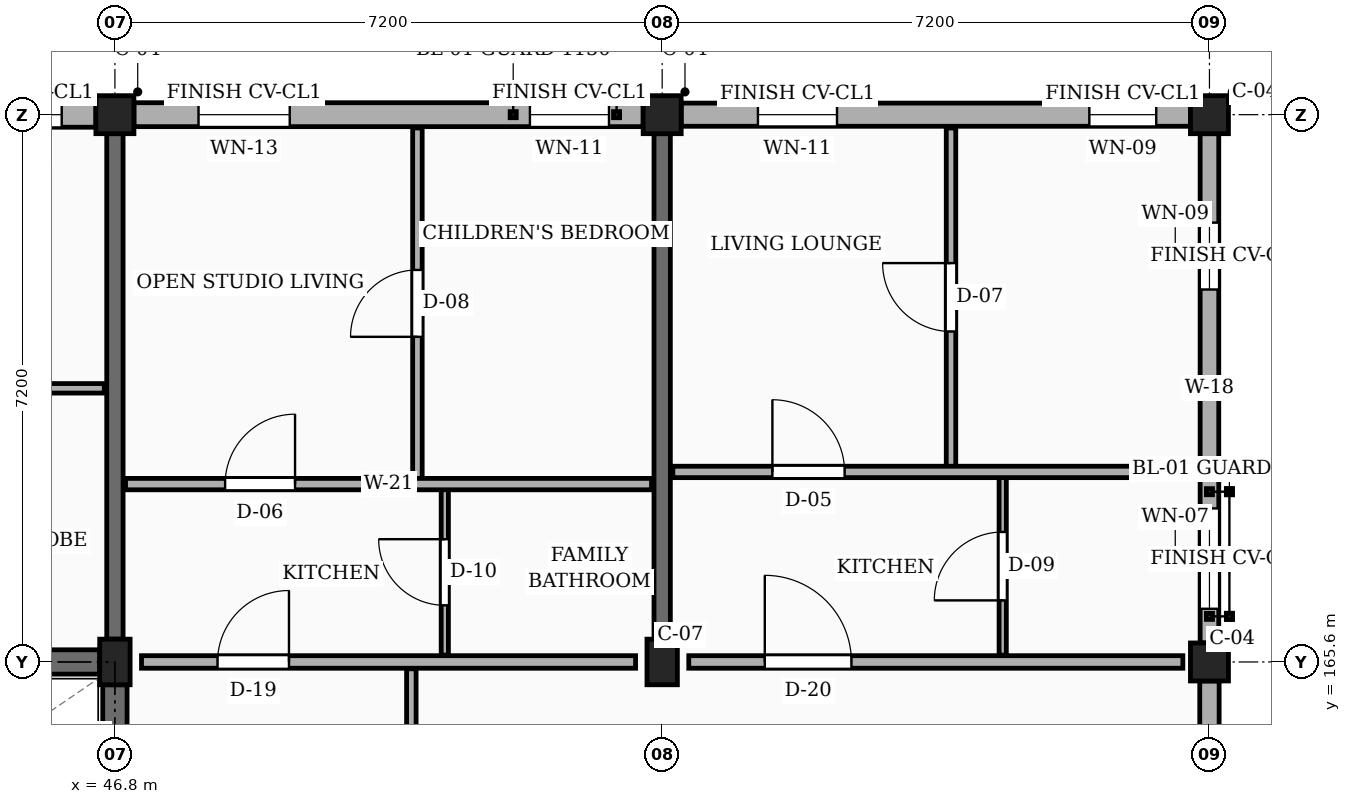
"""IFC4 building model, lengths in metres.
Left out: names, types, materials, properties, quantities, classifications, styles, units other than length and angle.
Written with IfcOpenShell. Run it as: python <this file> out.ifc"""

import sys

from ifc_helpers import new_model, si_unit, direction, frame, frame_2d, origin, origin_2d, place, context, subcontext, project, spatial, rectangle, extrude, element, fill, save


model = new_model("IFC4")
c1 = context("Model", 3, precision=1e-05, world=origin(), true_north=direction((0.0, 1.0)))
c2 = subcontext(c1, "Body", "Model", "MODEL_VIEW")
j1 = project(units=[si_unit("LENGTHUNIT", "METRE"), si_unit("PLANEANGLEUNIT", "RADIAN")], contexts=[c1])
p1 = place(None, origin())
s1 = spatial("IfcSite", under=j1, at=p1, CompositionType="ELEMENT")
p2 = place(p1, origin())
s2 = spatial("IfcBuilding", under=s1, at=p2, CompositionType="ELEMENT")
p3 = place(p2, frame((0.0, 0.0, 32.85)))
s3 = spatial("IfcBuildingStorey", under=s2, at=p3, CompositionType="ELEMENT", Elevation=32.85)
p4 = place(p3, frame((46.8, 165.6, 0.0), z_axis=(0.0, 0.0, 1.0), x_axis=(1.0, 0.0, 0.0)))
e1 = element("IfcColumn", 1, at=p4, inside=s3, PredefinedType="COLUMN", context=c2, shape_type="SweptSolid", body=[
    extrude(rectangle(XDim=0.4, YDim=0.6, at=origin_2d()), origin(), (0.0, 0.0, 1.0), 3.15),
])
p5 = place(p3, frame((46.8, 172.8, 0.0), z_axis=(0.0, 0.0, 1.0), x_axis=(1.0, 0.0, 0.0)))
e2 = element("IfcColumn", 2, at=p5, inside=s3, PredefinedType="COLUMN", context=c2, shape_type="SweptSolid", body=[
    extrude(rectangle(XDim=0.5, YDim=0.5, at=origin_2d()), origin(), (0.0, 0.0, 1.0), 3.15),
])
p6 = place(p3, frame((54.0, 165.6, 0.0), z_axis=(0.0, 0.0, 1.0), x_axis=(1.0, 0.0, 0.0)))
e3 = element("IfcColumn", 3, at=p6, inside=s3, PredefinedType="COLUMN", context=c2, shape_type="SweptSolid", body=[
    extrude(rectangle(XDim=0.4, YDim=0.6, at=origin_2d()), origin(), (0.0, 0.0, 1.0), 3.15),
])
for number, where, z_axis, x_axis in (
    (4, (54.0, 172.8, 0.0), (0.0, 0.0, 1.0), (1.0, 0.0, 0.0)),
    (5, (61.2, 165.6, 0.0), (0.0, 0.0, 1.0), (1.0, 0.0, 0.0)),
    (6, (61.2, 172.8, 0.0), (0.0, 0.0, 1.0), (1.0, 0.0, 0.0)),
):
    element("IfcColumn", number, at=place(p3, frame(where, z_axis=z_axis, x_axis=x_axis)), inside=s3, PredefinedType="COLUMN", context=c2, shape_type="SweptSolid", body=[
        extrude(rectangle(XDim=0.5, YDim=0.5, at=origin_2d()), origin(), (0.0, 0.0, 1.0), 3.15),
    ])
for number, where, z_axis, x_axis in (
    (7, (46.8, 165.9, 0.0), (0.0, 0.0, 1.0), (0.0, 1.0, 0.0)),
    (8, (54.0, 165.9, 0.0), (0.0, 0.0, 1.0), (0.0, 1.0, 0.0)),
):
    element("IfcWall", number, at=place(p3, frame(where, z_axis=z_axis, x_axis=x_axis)), inside=s3, PredefinedType="SOLIDWALL", context=c2, shape_type="SweptSolid", body=[
        extrude(rectangle(XDim=6.65, YDim=0.215, at=frame_2d((3.325, 0.0))), origin(), (0.0, 0.0, 1.0), 2.185),
    ])
p7 = place(p3, frame((61.2, 158.65, 0.0), z_axis=(0.0, 0.0, 1.0), x_axis=(0.0, 1.0, 0.0)))
e9 = element("IfcWall", 9, at=p7, inside=s3, PredefinedType="SOLIDWALL", context=c2, shape_type="SweptSolid", body=[
    extrude(rectangle(XDim=6.7, YDim=0.255, at=frame_2d((3.35, 0.0))), origin(), (0.0, 0.0, 1.0), 2.455),
])
p8 = place(p7, frame((0.45, 0.0, 0.78)))
e10 = element("IfcOpeningElement", 10, at=p8, cuts=e9, PredefinedType="OPENING", context=c2, shape_type="SweptSolid", body=[
    extrude(rectangle(XDim=1.16, YDim=1.15, at=frame_2d((0.58, 0.575))), frame((0.0, 0.137, 0.0), z_axis=(0.0, -1.0, 0.0), x_axis=(1.0, 0.0, 0.0)), (0.0, 0.0, 1.0), 0.275),
])
p9 = place(p7, frame((4.65, 0.0, 0.78)))
e11 = element("IfcOpeningElement", 11, at=p9, cuts=e9, PredefinedType="OPENING", context=c2, shape_type="SweptSolid", body=[
    extrude(rectangle(XDim=1.32, YDim=1.15, at=frame_2d((0.66, 0.575))), frame((0.0, 0.137, 0.0), z_axis=(0.0, -1.0, 0.0), x_axis=(1.0, 0.0, 0.0)), (0.0, 0.0, 1.0), 0.275),
])
p10 = place(p3, frame((61.2, 165.85, 0.0), z_axis=(0.0, 0.0, 1.0), x_axis=(0.0, 1.0, 0.0)))
e12 = element("IfcWall", 12, at=p10, inside=s3, PredefinedType="SOLIDWALL", context=c2, shape_type="SweptSolid", body=[
    extrude(rectangle(XDim=6.7, YDim=0.245, at=frame_2d((3.35, 0.0))), origin(), (0.0, 0.0, 1.0), 2.455),
])
p11 = place(p10, frame((0.45, 0.0, 0.78)))
e13 = element("IfcOpeningElement", 13, at=p11, cuts=e12, PredefinedType="OPENING", context=c2, shape_type="SweptSolid", body=[
    extrude(rectangle(XDim=1.32, YDim=1.15, at=frame_2d((0.66, 0.575))), frame((0.0, 0.133, 0.0), z_axis=(0.0, -1.0, 0.0), x_axis=(1.0, 0.0, 0.0)), (0.0, 0.0, 1.0), 0.265),
])
p12 = place(p10, frame((4.65, 0.0, 0.78)))
e14 = element("IfcOpeningElement", 14, at=p12, cuts=e12, PredefinedType="OPENING", context=c2, shape_type="SweptSolid", body=[
    extrude(rectangle(XDim=0.88, YDim=1.26, at=frame_2d((0.44, 0.63))), frame((0.0, 0.133, 0.0), z_axis=(0.0, -1.0, 0.0), x_axis=(1.0, 0.0, 0.0)), (0.0, 0.0, 1.0), 0.265),
])
p13 = place(p3, frame((60.95, 172.8, 0.0), z_axis=(0.0, 0.0, 1.0), x_axis=(-1.0, 0.0, 0.0)))
e15 = element("IfcWall", 15, at=p13, inside=s3, PredefinedType="SOLIDWALL", context=c2, shape_type="SweptSolid", body=[
    extrude(rectangle(XDim=6.7, YDim=0.305, at=frame_2d((3.35, 0.0))), origin(), (0.0, 0.0, 1.0), 2.455),
])
p14 = place(p13, frame((0.45, 0.0, 0.78)))
e16 = element("IfcOpeningElement", 16, at=p14, cuts=e15, PredefinedType="OPENING", context=c2, shape_type="SweptSolid", body=[
    extrude(rectangle(XDim=0.88, YDim=1.26, at=frame_2d((0.44, 0.63))), frame((0.0, 0.163, 0.0), z_axis=(0.0, -1.0, 0.0), x_axis=(1.0, 0.0, 0.0)), (0.0, 0.0, 1.0), 0.325),
])
p15 = place(p13, frame((4.65, 0.0, 0.78)))
e17 = element("IfcOpeningElement", 17, at=p15, cuts=e15, PredefinedType="OPENING", context=c2, shape_type="SweptSolid", body=[
    extrude(rectangle(XDim=1.04, YDim=1.26, at=frame_2d((0.52, 0.63))), frame((0.0, 0.163, 0.0), z_axis=(0.0, -1.0, 0.0), x_axis=(1.0, 0.0, 0.0)), (0.0, 0.0, 1.0), 0.325),
])
p16 = place(p3, frame((53.75, 172.8, 0.0), z_axis=(0.0, 0.0, 1.0), x_axis=(-1.0, 0.0, 0.0)))
e18 = element("IfcWall", 18, at=p16, inside=s3, PredefinedType="SOLIDWALL", context=c2, shape_type="SweptSolid", body=[
    extrude(rectangle(XDim=6.7, YDim=0.315, at=frame_2d((3.35, 0.0))), origin(), (0.0, 0.0, 1.0), 2.455),
])
p17 = place(p16, frame((0.45, 0.0, 0.78)))
e19 = element("IfcOpeningElement", 19, at=p17, cuts=e18, PredefinedType="OPENING", context=c2, shape_type="SweptSolid", body=[
    extrude(rectangle(XDim=1.04, YDim=1.26, at=frame_2d((0.52, 0.63))), frame((0.0, 0.167, 0.0), z_axis=(0.0, -1.0, 0.0), x_axis=(1.0, 0.0, 0.0)), (0.0, 0.0, 1.0), 0.335),
])
p18 = place(p16, frame((4.65, 0.0, 0.78)))
e20 = element("IfcOpeningElement", 20, at=p18, cuts=e18, PredefinedType="OPENING", context=c2, shape_type="SweptSolid", body=[
    extrude(rectangle(XDim=1.2, YDim=1.26, at=frame_2d((0.6, 0.63))), frame((0.0, 0.167, 0.0), z_axis=(0.0, -1.0, 0.0), x_axis=(1.0, 0.0, 0.0)), (0.0, 0.0, 1.0), 0.335),
])
p19 = place(p3, frame((46.55, 172.8, 0.0), z_axis=(0.0, 0.0, 1.0), x_axis=(-1.0, 0.0, 0.0)))
e21 = element("IfcWall", 21, at=p19, inside=s3, PredefinedType="SOLIDWALL", context=c2, shape_type="SweptSolid", body=[
    extrude(rectangle(XDim=6.7, YDim=0.33, at=frame_2d((3.35, 0.0))), origin(), (0.0, 0.0, 1.0), 2.455),
])
p20 = place(p19, frame((0.45, 0.0, 0.78)))
e22 = element("IfcOpeningElement", 22, at=p20, cuts=e21, PredefinedType="OPENING", context=c2, shape_type="SweptSolid", body=[
    extrude(rectangle(XDim=1.2, YDim=1.26, at=frame_2d((0.6, 0.63))), frame((0.0, 0.175, 0.0), z_axis=(0.0, -1.0, 0.0), x_axis=(1.0, 0.0, 0.0)), (0.0, 0.0, 1.0), 0.35),
])
p21 = place(p19, frame((4.65, 0.0, 0.78)))
e23 = element("IfcOpeningElement", 23, at=p21, cuts=e21, PredefinedType="OPENING", context=c2, shape_type="SweptSolid", body=[
    extrude(rectangle(XDim=1.36, YDim=1.26, at=frame_2d((0.68, 0.63))), frame((0.0, 0.175, 0.0), z_axis=(0.0, -1.0, 0.0), x_axis=(1.0, 0.0, 0.0)), (0.0, 0.0, 1.0), 0.35),
])
p22 = place(p3, frame((39.8, 165.6, 0.0), z_axis=(0.0, 0.0, 1.0), x_axis=(1.0, 0.0, 0.0)))
e24 = element("IfcWall", 24, at=p22, inside=s3, PredefinedType="SHEAR", context=c2, shape_type="SweptSolid", body=[
    extrude(rectangle(XDim=6.8, YDim=0.32, at=frame_2d((3.4, 0.0))), origin(), (0.0, 0.0, 1.0), 2.885),
])
p23 = place(p3, frame((46.8, 158.7, 0.0), z_axis=(0.0, 0.0, 1.0), x_axis=(0.0, 1.0, 0.0)))
e25 = element("IfcWall", 25, at=p23, inside=s3, PredefinedType="SHEAR", context=c2, shape_type="SweptSolid", body=[
    extrude(rectangle(XDim=6.6, YDim=0.32, at=frame_2d((3.3, 0.0))), origin(), (0.0, 0.0, 1.0), 2.885),
])
p24 = place(p3, frame((47.15, 165.6, 0.0), z_axis=(0.0, 0.0, 1.0), x_axis=(1.0, 0.0, 0.0)))
e26 = element("IfcWall", 26, at=p24, inside=s3, PredefinedType="PARTITIONING", context=c2, shape_type="SweptSolid", body=[
    extrude(rectangle(XDim=6.5, YDim=0.165, at=frame_2d((3.25, 0.0))), origin(), (0.0, 0.0, 1.0), 2.32),
])
p25 = place(p24, frame((1.0, 0.0, 0.0)))
e27 = element("IfcOpeningElement", 27, at=p25, cuts=e26, PredefinedType="OPENING", context=c2, shape_type="SweptSolid", body=[
    extrude(rectangle(XDim=0.94, YDim=2.12, at=frame_2d((0.47, 1.06))), frame((0.0, 0.093, 0.0), z_axis=(0.0, -1.0, 0.0), x_axis=(1.0, 0.0, 0.0)), (0.0, 0.0, 1.0), 0.185),
])
p26 = place(p3, frame((54.35, 165.6, 0.0), z_axis=(0.0, 0.0, 1.0), x_axis=(1.0, 0.0, 0.0)))
e28 = element("IfcWall", 28, at=p26, inside=s3, PredefinedType="PARTITIONING", context=c2, shape_type="SweptSolid", body=[
    extrude(rectangle(XDim=6.5, YDim=0.165, at=frame_2d((3.25, 0.0))), origin(), (0.0, 0.0, 1.0), 2.32),
])
p27 = place(p26, frame((1.0, 0.0, 0.0)))
e29 = element("IfcOpeningElement", 29, at=p27, cuts=e28, PredefinedType="OPENING", context=c2, shape_type="SweptSolid", body=[
    extrude(rectangle(XDim=1.14, YDim=2.18, at=frame_2d((0.57, 1.09))), frame((0.0, 0.093, 0.0), z_axis=(0.0, -1.0, 0.0), x_axis=(1.0, 0.0, 0.0)), (0.0, 0.0, 1.0), 0.185),
])
p28 = place(p3, frame((39.74, 169.2, 0.0), z_axis=(0.0, 0.0, 1.0), x_axis=(1.0, 0.0, 0.0)))
e30 = element("IfcWall", 30, at=p28, inside=s3, PredefinedType="PARTITIONING", context=c2, shape_type="SweptSolid", body=[
    extrude(rectangle(XDim=6.92, YDim=0.125, at=frame_2d((3.46, 0.0))), origin(), (0.0, 0.0, 1.0), 2.32),
])
p29 = place(p28, frame((1.05, 0.0, 0.0)))
e31 = element("IfcOpeningElement", 31, at=p29, cuts=e30, PredefinedType="OPENING", context=c2, shape_type="SweptSolid", body=[
    extrude(rectangle(XDim=0.87, YDim=2.05, at=frame_2d((0.435, 1.025))), frame((0.0, 0.073, 0.0), z_axis=(0.0, -1.0, 0.0), x_axis=(1.0, 0.0, 0.0)), (0.0, 0.0, 1.0), 0.145),
])
p30 = place(p28, frame((4.45, 0.0, 0.0)))
e32 = element("IfcOpeningElement", 32, at=p30, cuts=e30, PredefinedType="OPENING", context=c2, shape_type="SweptSolid", body=[
    extrude(rectangle(XDim=0.88, YDim=2.08, at=frame_2d((0.44, 1.04))), frame((0.0, 0.073, 0.0), z_axis=(0.0, -1.0, 0.0), x_axis=(1.0, 0.0, 0.0)), (0.0, 0.0, 1.0), 0.145),
])
p31 = place(p3, frame((50.7, 158.49, 0.0), z_axis=(0.0, 0.0, 1.0), x_axis=(0.0, 1.0, 0.0)))
e33 = element("IfcWall", 33, at=p31, inside=s3, PredefinedType="PARTITIONING", context=c2, shape_type="SweptSolid", body=[
    extrude(rectangle(XDim=7.02, YDim=0.125, at=frame_2d((3.51, 0.0))), origin(), (0.0, 0.0, 1.0), 2.32),
])
p32 = place(p31, frame((2.85, 0.0, 0.0)))
e34 = element("IfcOpeningElement", 34, at=p32, cuts=e33, PredefinedType="OPENING", context=c2, shape_type="SweptSolid", body=[
    extrude(rectangle(XDim=1.02, YDim=2.15, at=frame_2d((0.51, 1.075))), frame((0.0, 0.073, 0.0), z_axis=(0.0, -1.0, 0.0), x_axis=(1.0, 0.0, 0.0)), (0.0, 0.0, 1.0), 0.145),
])
p33 = place(p3, frame((50.78, 168.01, 0.0), z_axis=(0.0, 0.0, 1.0), x_axis=(0.0, 1.0, 0.0)))
e35 = element("IfcWall", 35, at=p33, inside=s3, PredefinedType="PARTITIONING", context=c2, shape_type="SweptSolid", body=[
    extrude(rectangle(XDim=4.615, YDim=0.125, at=frame_2d((2.308, 0.0))), origin(), (0.0, 0.0, 1.0), 2.32),
])
p34 = place(p33, frame((1.867, 0.0, 0.0)))
e36 = element("IfcOpeningElement", 36, at=p34, cuts=e35, PredefinedType="OPENING", context=c2, shape_type="SweptSolid", body=[
    extrude(rectangle(XDim=0.88, YDim=2.08, at=frame_2d((0.44, 1.04))), frame((0.0, 0.073, 0.0), z_axis=(0.0, -1.0, 0.0), x_axis=(1.0, 0.0, 0.0)), (0.0, 0.0, 1.0), 0.145),
])
p35 = place(p3, frame((51.14, 165.69, 0.0), z_axis=(0.0, 0.0, 1.0), x_axis=(0.0, 1.0, 0.0)))
e37 = element("IfcWall", 37, at=p35, inside=s3, PredefinedType="PARTITIONING", context=c2, shape_type="SweptSolid", body=[
    extrude(rectangle(XDim=2.18, YDim=0.095, at=frame_2d((1.09, 0.0))), origin(), (0.0, 0.0, 1.0), 2.32),
])
p36 = place(p35, frame((0.655, 0.0, 0.0)))
e38 = element("IfcOpeningElement", 38, at=p36, cuts=e37, PredefinedType="OPENING", context=c2, shape_type="SweptSolid", body=[
    extrude(rectangle(XDim=0.87, YDim=2.05, at=frame_2d((0.435, 1.025))), frame((0.0, 0.058, 0.0), z_axis=(0.0, -1.0, 0.0), x_axis=(1.0, 0.0, 0.0)), (0.0, 0.0, 1.0), 0.115),
])
p37 = place(p3, frame((46.94, 167.94, 0.0), z_axis=(0.0, 0.0, 1.0), x_axis=(1.0, 0.0, 0.0)))
e39 = element("IfcWall", 39, at=p37, inside=s3, PredefinedType="PARTITIONING", context=c2, shape_type="SweptSolid", body=[
    extrude(rectangle(XDim=6.92, YDim=0.15, at=frame_2d((3.46, 0.0))), origin(), (0.0, 0.0, 1.0), 2.32),
])
p38 = place(p37, frame((1.31, 0.0, 0.0)))
e40 = element("IfcOpeningElement", 40, at=p38, cuts=e39, PredefinedType="OPENING", context=c2, shape_type="SweptSolid", body=[
    extrude(rectangle(XDim=0.92, YDim=2.1, at=frame_2d((0.46, 1.05))), frame((0.0, 0.085, 0.0), z_axis=(0.0, -1.0, 0.0), x_axis=(1.0, 0.0, 0.0)), (0.0, 0.0, 1.0), 0.17),
])
p39 = place(p3, frame((57.8, 168.17, 0.0), z_axis=(0.0, 0.0, 1.0), x_axis=(0.0, 1.0, 0.0)))
e41 = element("IfcWall", 41, at=p39, inside=s3, PredefinedType="PARTITIONING", context=c2, shape_type="SweptSolid", body=[
    extrude(rectangle(XDim=4.455, YDim=0.125, at=frame_2d((2.228, 0.0))), origin(), (0.0, 0.0, 1.0), 2.32),
])
p40 = place(p39, frame((1.778, 0.0, 0.0)))
e42 = element("IfcOpeningElement", 42, at=p40, cuts=e41, PredefinedType="OPENING", context=c2, shape_type="SweptSolid", body=[
    extrude(rectangle(XDim=0.9, YDim=2.1, at=frame_2d((0.45, 1.05))), frame((0.0, 0.073, 0.0), z_axis=(0.0, -1.0, 0.0), x_axis=(1.0, 0.0, 0.0)), (0.0, 0.0, 1.0), 0.145),
])
p41 = place(p3, frame((58.48, 165.69, 0.0), z_axis=(0.0, 0.0, 1.0), x_axis=(0.0, 1.0, 0.0)))
e43 = element("IfcWall", 43, at=p41, inside=s3, PredefinedType="PARTITIONING", context=c2, shape_type="SweptSolid", body=[
    extrude(rectangle(XDim=2.34, YDim=0.095, at=frame_2d((1.17, 0.0))), origin(), (0.0, 0.0, 1.0), 2.32),
])
p42 = place(p41, frame((0.72, 0.0, 0.0)))
e44 = element("IfcOpeningElement", 44, at=p42, cuts=e43, PredefinedType="OPENING", context=c2, shape_type="SweptSolid", body=[
    extrude(rectangle(XDim=0.9, YDim=2.05, at=frame_2d((0.45, 1.025))), frame((0.0, 0.058, 0.0), z_axis=(0.0, -1.0, 0.0), x_axis=(1.0, 0.0, 0.0)), (0.0, 0.0, 1.0), 0.115),
])
p43 = place(p3, frame((54.14, 168.1, 0.0), z_axis=(0.0, 0.0, 1.0), x_axis=(1.0, 0.0, 0.0)))
e45 = element("IfcWall", 45, at=p43, inside=s3, PredefinedType="PARTITIONING", context=c2, shape_type="SweptSolid", body=[
    extrude(rectangle(XDim=6.885, YDim=0.15, at=frame_2d((3.442, 0.0))), origin(), (0.0, 0.0, 1.0), 2.32),
])
p44 = place(p43, frame((1.31, 0.0, 0.0)))
e46 = element("IfcOpeningElement", 46, at=p44, cuts=e45, PredefinedType="OPENING", context=c2, shape_type="SweptSolid", body=[
    extrude(rectangle(XDim=0.95, YDim=2.1, at=frame_2d((0.475, 1.05))), frame((0.0, 0.085, 0.0), z_axis=(0.0, -1.0, 0.0), x_axis=(1.0, 0.0, 0.0)), (0.0, 0.0, 1.0), 0.17),
])
p45 = place(p11, origin())
e47 = element("IfcWindow", 47, at=p45, inside=s3, PartitioningType="SINGLE_PANEL", PredefinedType="WINDOW", context=c2, shape_type="SweptSolid", body=[
    extrude(rectangle(XDim=1.32, YDim=1.15, at=frame_2d((0.66, 0.575))), frame((0.0, 0.03, 0.0), z_axis=(0.0, -1.0, 0.0), x_axis=(1.0, 0.0, 0.0)), (0.0, 0.0, 1.0), 0.06),
])
fill(e13, e47)
p46 = place(p12, origin())
e48 = element("IfcWindow", 48, at=p46, inside=s3, PartitioningType="SINGLE_PANEL", PredefinedType="WINDOW", context=c2, shape_type="SweptSolid", body=[
    extrude(rectangle(XDim=0.88, YDim=1.26, at=frame_2d((0.44, 0.63))), frame((0.0, 0.03, 0.0), z_axis=(0.0, -1.0, 0.0), x_axis=(1.0, 0.0, 0.0)), (0.0, 0.0, 1.0), 0.06),
])
fill(e14, e48)
p47 = place(p14, origin())
e49 = element("IfcWindow", 49, at=p47, inside=s3, PartitioningType="SINGLE_PANEL", PredefinedType="WINDOW", context=c2, shape_type="SweptSolid", body=[
    extrude(rectangle(XDim=0.88, YDim=1.26, at=frame_2d((0.44, 0.63))), frame((0.0, 0.03, 0.0), z_axis=(0.0, -1.0, 0.0), x_axis=(1.0, 0.0, 0.0)), (0.0, 0.0, 1.0), 0.06),
])
fill(e16, e49)
p48 = place(p15, origin())
e50 = element("IfcWindow", 50, at=p48, inside=s3, PartitioningType="SINGLE_PANEL", PredefinedType="WINDOW", context=c2, shape_type="SweptSolid", body=[
    extrude(rectangle(XDim=1.04, YDim=1.26, at=frame_2d((0.52, 0.63))), frame((0.0, 0.03, 0.0), z_axis=(0.0, -1.0, 0.0), x_axis=(1.0, 0.0, 0.0)), (0.0, 0.0, 1.0), 0.06),
])
fill(e17, e50)
p49 = place(p17, origin())
e51 = element("IfcWindow", 51, at=p49, inside=s3, PartitioningType="SINGLE_PANEL", PredefinedType="WINDOW", context=c2, shape_type="SweptSolid", body=[
    extrude(rectangle(XDim=1.04, YDim=1.26, at=frame_2d((0.52, 0.63))), frame((0.0, 0.03, 0.0), z_axis=(0.0, -1.0, 0.0), x_axis=(1.0, 0.0, 0.0)), (0.0, 0.0, 1.0), 0.06),
])
fill(e19, e51)
p50 = place(p18, origin())
e52 = element("IfcWindow", 52, at=p50, inside=s3, PartitioningType="SINGLE_PANEL", PredefinedType="WINDOW", context=c2, shape_type="SweptSolid", body=[
    extrude(rectangle(XDim=1.2, YDim=1.26, at=frame_2d((0.6, 0.63))), frame((0.0, 0.03, 0.0), z_axis=(0.0, -1.0, 0.0), x_axis=(1.0, 0.0, 0.0)), (0.0, 0.0, 1.0), 0.06),
])
fill(e20, e52)
p51 = place(p20, origin())
e53 = element("IfcWindow", 53, at=p51, inside=s3, PartitioningType="SINGLE_PANEL", PredefinedType="WINDOW", context=c2, shape_type="SweptSolid", body=[
    extrude(rectangle(XDim=1.2, YDim=1.26, at=frame_2d((0.6, 0.63))), frame((0.0, 0.03, 0.0), z_axis=(0.0, -1.0, 0.0), x_axis=(1.0, 0.0, 0.0)), (0.0, 0.0, 1.0), 0.06),
])
fill(e22, e53)
p52 = place(p25, origin())
e54 = element("IfcDoor", 54, at=p52, inside=s3, OperationType="SINGLE_SWING_RIGHT", PredefinedType="DOOR", context=c2, shape_type="SweptSolid", body=[
    extrude(rectangle(XDim=0.94, YDim=2.12, at=frame_2d((0.47, 1.06))), frame((0.0, 0.025, 0.0), z_axis=(0.0, -1.0, 0.0), x_axis=(1.0, 0.0, 0.0)), (0.0, 0.0, 1.0), 0.05),
])
fill(e27, e54)
p53 = place(p27, origin())
e55 = element("IfcDoor", 55, at=p53, inside=s3, OperationType="SINGLE_SWING_LEFT", PredefinedType="DOOR", context=c2, shape_type="SweptSolid", body=[
    extrude(rectangle(XDim=1.14, YDim=2.18, at=frame_2d((0.57, 1.09))), frame((0.0, 0.025, 0.0), z_axis=(0.0, -1.0, 0.0), x_axis=(1.0, 0.0, 0.0)), (0.0, 0.0, 1.0), 0.05),
])
fill(e29, e55)
p54 = place(p34, origin())
e56 = element("IfcDoor", 56, at=p54, inside=s3, OperationType="SINGLE_SWING_LEFT", PredefinedType="DOOR", context=c2, shape_type="SweptSolid", body=[
    extrude(rectangle(XDim=0.88, YDim=2.08, at=frame_2d((0.44, 1.04))), frame((0.0, 0.025, 0.0), z_axis=(0.0, -1.0, 0.0), x_axis=(1.0, 0.0, 0.0)), (0.0, 0.0, 1.0), 0.05),
])
fill(e36, e56)
p55 = place(p36, origin())
e57 = element("IfcDoor", 57, at=p55, inside=s3, OperationType="SINGLE_SWING_RIGHT", PredefinedType="DOOR", context=c2, shape_type="SweptSolid", body=[
    extrude(rectangle(XDim=0.87, YDim=2.05, at=frame_2d((0.435, 1.025))), frame((0.0, 0.025, 0.0), z_axis=(0.0, -1.0, 0.0), x_axis=(1.0, 0.0, 0.0)), (0.0, 0.0, 1.0), 0.05),
])
fill(e38, e57)
p56 = place(p38, origin())
e58 = element("IfcDoor", 58, at=p56, inside=s3, OperationType="SINGLE_SWING_RIGHT", PredefinedType="DOOR", context=c2, shape_type="SweptSolid", body=[
    extrude(rectangle(XDim=0.92, YDim=2.1, at=frame_2d((0.46, 1.05))), frame((0.0, 0.025, 0.0), z_axis=(0.0, -1.0, 0.0), x_axis=(1.0, 0.0, 0.0)), (0.0, 0.0, 1.0), 0.05),
])
fill(e40, e58)
p57 = place(p40, origin())
e59 = element("IfcDoor", 59, at=p57, inside=s3, OperationType="SINGLE_SWING_RIGHT", PredefinedType="DOOR", context=c2, shape_type="SweptSolid", body=[
    extrude(rectangle(XDim=0.9, YDim=2.1, at=frame_2d((0.45, 1.05))), frame((0.0, 0.025, 0.0), z_axis=(0.0, -1.0, 0.0), x_axis=(1.0, 0.0, 0.0)), (0.0, 0.0, 1.0), 0.05),
])
fill(e42, e59)
p58 = place(p42, origin())
e60 = element("IfcDoor", 60, at=p58, inside=s3, OperationType="SINGLE_SWING_LEFT", PredefinedType="DOOR", context=c2, shape_type="SweptSolid", body=[
    extrude(rectangle(XDim=0.9, YDim=2.05, at=frame_2d((0.45, 1.025))), frame((0.0, 0.025, 0.0), z_axis=(0.0, -1.0, 0.0), x_axis=(1.0, 0.0, 0.0)), (0.0, 0.0, 1.0), 0.05),
])
fill(e44, e60)
p59 = place(p44, origin())
e61 = element("IfcDoor", 61, at=p59, inside=s3, OperationType="SINGLE_SWING_LEFT", PredefinedType="DOOR", context=c2, shape_type="SweptSolid", body=[
    extrude(rectangle(XDim=0.95, YDim=2.1, at=frame_2d((0.475, 1.05))), frame((0.0, 0.025, 0.0), z_axis=(0.0, -1.0, 0.0), x_axis=(1.0, 0.0, 0.0)), (0.0, 0.0, 1.0), 0.05),
])
fill(e46, e61)
save(model, sys.argv[1])
